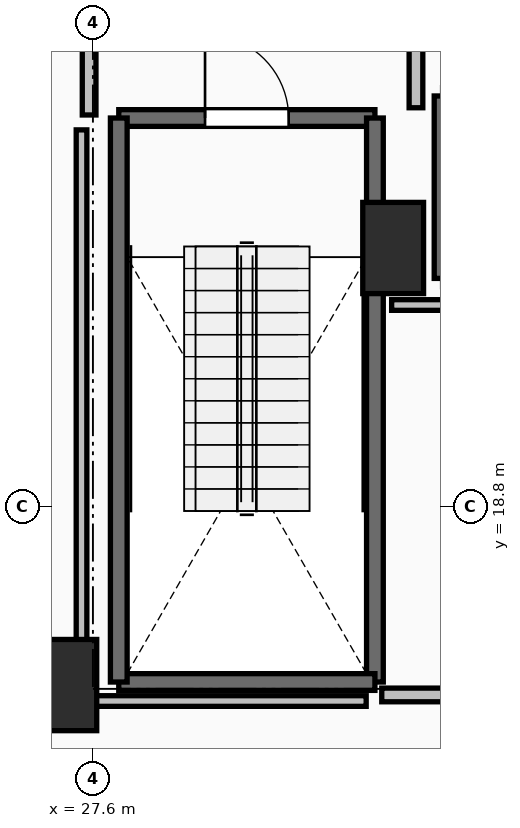
"""IFC4 building model, lengths in metres.
Left out: names, types, materials, properties, quantities, classifications, styles, units other than length and angle.
Written with IfcOpenShell. Run it as: python <this file> out.ifc"""

import sys

from ifc_helpers import new_model, si_unit, direction, frame, frame_2d, origin, origin_2d, place, context, subcontext, project, spatial, rectangle, extrude, element, fill, save


model = new_model("IFC4")
c1 = context("Model", 3, precision=1e-05, world=origin(), true_north=direction((0.0, 1.0)))
c2 = subcontext(c1, "Body", "Model", "MODEL_VIEW")
j1 = project(units=[si_unit("LENGTHUNIT", "METRE"), si_unit("PLANEANGLEUNIT", "RADIAN")], contexts=[c1])
p1 = place(None, origin())
s1 = spatial("IfcSite", under=j1, at=p1, CompositionType="ELEMENT")
p2 = place(p1, origin())
s2 = spatial("IfcBuilding", under=s1, at=p2, CompositionType="ELEMENT")
p3 = place(p2, frame((0.0, 0.0, 74.3)))
s3 = spatial("IfcBuildingStorey", under=s2, at=p3, CompositionType="ELEMENT", Elevation=74.3)
for number, where, z_axis, x_axis in (
    (1, (27.25, 16.45, 0.0), (0.0, 0.0, 1.0), (1.0, 0.0, 0.0)),
    (2, (31.55, 22.2, 0.0), (0.0, 0.0, 1.0), (1.0, 0.0, 0.0)),
):
    element("IfcColumn", number, at=place(p3, frame(where, z_axis=z_axis, x_axis=x_axis)), inside=s3, PredefinedType="PILASTER", context=c2, shape_type="SweptSolid", body=[
        extrude(rectangle(XDim=0.8, YDim=1.2, at=origin_2d()), origin(), (0.0, 0.0, 1.0), 4.5),
    ])
p4 = place(p3, frame((27.94, 23.91, 0.0), z_axis=(0.0, 0.0, 1.0), x_axis=(1.0, 0.0, 0.0)))
e3 = element("IfcWall", 3, at=p4, inside=s3, PredefinedType="SOLIDWALL", context=c2, shape_type="SweptSolid", body=[
    extrude(rectangle(XDim=3.37, YDim=0.22, at=frame_2d((1.685, 0.0))), origin(), (0.0, 0.0, 1.0), 4.24),
])
p5 = place(p4, frame((1.135, 0.0, 0.0)))
e4 = element("IfcOpeningElement", 4, at=p5, cuts=e3, PredefinedType="OPENING", context=c2, shape_type="SweptSolid", body=[
    extrude(rectangle(XDim=1.1, YDim=2.15, at=frame_2d((0.55, 1.075))), frame((0.0, 0.125, 0.0), z_axis=(0.0, -1.0, 0.0), x_axis=(1.0, 0.0, 0.0)), (0.0, 0.0, 1.0), 0.25),
])
p6 = place(p3, frame((31.31, 23.91, 0.0), z_axis=(0.0, 0.0, 1.0), x_axis=(0.0, -1.0, 0.0)))
e5 = element("IfcWall", 5, at=p6, inside=s3, PredefinedType="SOLIDWALL", context=c2, shape_type="SweptSolid", body=[
    extrude(rectangle(XDim=7.42, YDim=0.22, at=frame_2d((3.71, 0.0))), origin(), (0.0, 0.0, 1.0), 4.24),
])
p7 = place(p3, frame((31.31, 16.49, 0.0), z_axis=(0.0, 0.0, 1.0), x_axis=(-1.0, 0.0, 0.0)))
e6 = element("IfcWall", 6, at=p7, inside=s3, PredefinedType="SOLIDWALL", context=c2, shape_type="SweptSolid", body=[
    extrude(rectangle(XDim=3.37, YDim=0.22, at=frame_2d((1.685, 0.0))), origin(), (0.0, 0.0, 1.0), 4.24),
])
p8 = place(p3, frame((27.94, 16.49, 0.0), z_axis=(0.0, 0.0, 1.0), x_axis=(0.0, 1.0, 0.0)))
e7 = element("IfcWall", 7, at=p8, inside=s3, PredefinedType="SOLIDWALL", context=c2, shape_type="SweptSolid", body=[
    extrude(rectangle(XDim=7.42, YDim=0.22, at=frame_2d((3.71, 0.0))), origin(), (0.0, 0.0, 1.0), 4.24),
])
p9 = place(p3, frame((32.2, 24.2, 0.0), z_axis=(0.0, 0.0, 1.0), x_axis=(0.0, -1.0, 0.0)))
e8 = element("IfcWall", 8, at=p9, inside=s3, PredefinedType="SOLIDWALL", context=c2, shape_type="SweptSolid", body=[
    extrude(rectangle(XDim=2.4, YDim=0.22, at=frame_2d((1.2, 0.0))), origin(), (0.0, 0.0, 1.0), 4.24),
])
p10 = place(p3, frame((31.85, 24.045, 0.0), z_axis=(0.0, 0.0, 1.0), x_axis=(0.0, 1.0, 0.0)))
e9 = element("IfcWall", 9, at=p10, inside=s3, PredefinedType="PARTITIONING", context=c2, shape_type="SweptSolid", body=[
    extrude(rectangle(XDim=3.91, YDim=0.18, at=frame_2d((1.955, 0.0))), origin(), (0.0, 0.0, 1.0), 4.24),
])
p11 = place(p10, frame((1.355, 0.0, 0.0)))
e10 = element("IfcOpeningElement", 10, at=p11, cuts=e9, PredefinedType="OPENING", context=c2, shape_type="SweptSolid", body=[
    extrude(rectangle(XDim=1.2, YDim=2.15, at=frame_2d((0.6, 1.075))), frame((0.0, 0.105, 0.0), z_axis=(0.0, -1.0, 0.0), x_axis=(1.0, 0.0, 0.0)), (0.0, 0.0, 1.0), 0.21),
])
p12 = place(p3, frame((27.55, 28.0, 0.0), z_axis=(0.0, 0.0, 1.0), x_axis=(0.0, -1.0, 0.0)))
e11 = element("IfcWall", 11, at=p12, inside=s3, PredefinedType="PARTITIONING", context=c2, shape_type="SweptSolid", body=[
    extrude(rectangle(XDim=4.05, YDim=0.18, at=frame_2d((2.025, 0.0))), origin(), (0.0, 0.0, 1.0), 4.24),
])
p13 = place(p12, frame((1.425, 0.0, 0.0)))
e12 = element("IfcOpeningElement", 12, at=p13, cuts=e11, PredefinedType="OPENING", context=c2, shape_type="SweptSolid", body=[
    extrude(rectangle(XDim=1.2, YDim=2.15, at=frame_2d((0.6, 1.075))), frame((0.0, 0.105, 0.0), z_axis=(0.0, -1.0, 0.0), x_axis=(1.0, 0.0, 0.0)), (0.0, 0.0, 1.0), 0.21),
])
p14 = place(p3, frame((31.4, 16.32, 0.0), z_axis=(0.0, 0.0, 1.0), x_axis=(1.0, 0.0, 0.0)))
e13 = element("IfcWall", 13, at=p14, inside=s3, PredefinedType="PARTITIONING", context=c2, shape_type="SweptSolid", body=[
    extrude(rectangle(XDim=3.55, YDim=0.18, at=frame_2d((1.775, 0.0))), origin(), (0.0, 0.0, 1.0), 4.24),
])
p15 = place(p14, frame((1.35, 0.0, 0.0)))
e14 = element("IfcOpeningElement", 14, at=p15, cuts=e13, PredefinedType="OPENING", context=c2, shape_type="SweptSolid", body=[
    extrude(rectangle(XDim=0.85, YDim=2.1, at=frame_2d((0.425, 1.05))), frame((0.0, 0.105, 0.0), z_axis=(0.0, -1.0, 0.0), x_axis=(1.0, 0.0, 0.0)), (0.0, 0.0, 1.0), 0.21),
])
p16 = place(p3, frame((34.73, 21.45, 0.0), z_axis=(0.0, 0.0, 1.0), x_axis=(-1.0, 0.0, 0.0)))
e15 = element("IfcWall", 15, at=p16, inside=s3, PredefinedType="PARTITIONING", context=c2, shape_type="SweptSolid", body=[
    extrude(rectangle(XDim=3.2, YDim=0.14, at=frame_2d((1.6, 0.0))), origin(), (0.0, 0.0, 1.0), 4.24),
])
p17 = place(p3, frame((31.195, 16.24, 0.0), z_axis=(0.0, 0.0, 1.0), x_axis=(-1.0, 0.0, 0.0)))
e16 = element("IfcWall", 16, at=p17, inside=s3, PredefinedType="PARTITIONING", context=c2, shape_type="SweptSolid", body=[
    extrude(rectangle(XDim=3.745, YDim=0.14, at=frame_2d((1.873, 0.0))), origin(), (0.0, 0.0, 1.0), 3.432),
])
p18 = place(p3, frame((27.45, 16.24, 0.0), z_axis=(0.0, 0.0, 1.0), x_axis=(0.0, 1.0, 0.0)))
e17 = element("IfcWall", 17, at=p18, inside=s3, PredefinedType="PARTITIONING", context=c2, shape_type="SweptSolid", body=[
    extrude(rectangle(XDim=7.514, YDim=0.14, at=frame_2d((3.757, 0.0))), origin(), (0.0, 0.0, 1.0), 3.432),
])
p19 = place(p5, origin())
e18 = element("IfcDoor", 18, at=p19, inside=s3, OperationType="SINGLE_SWING_LEFT", PredefinedType="DOOR", context=c2, shape_type="SweptSolid", body=[
    extrude(rectangle(XDim=1.1, YDim=2.15, at=frame_2d((0.55, 1.075))), frame((0.0, 0.025, 0.0), z_axis=(0.0, -1.0, 0.0), x_axis=(1.0, 0.0, 0.0)), (0.0, 0.0, 1.0), 0.05),
])
fill(e4, e18)
save(model, sys.argv[1])
